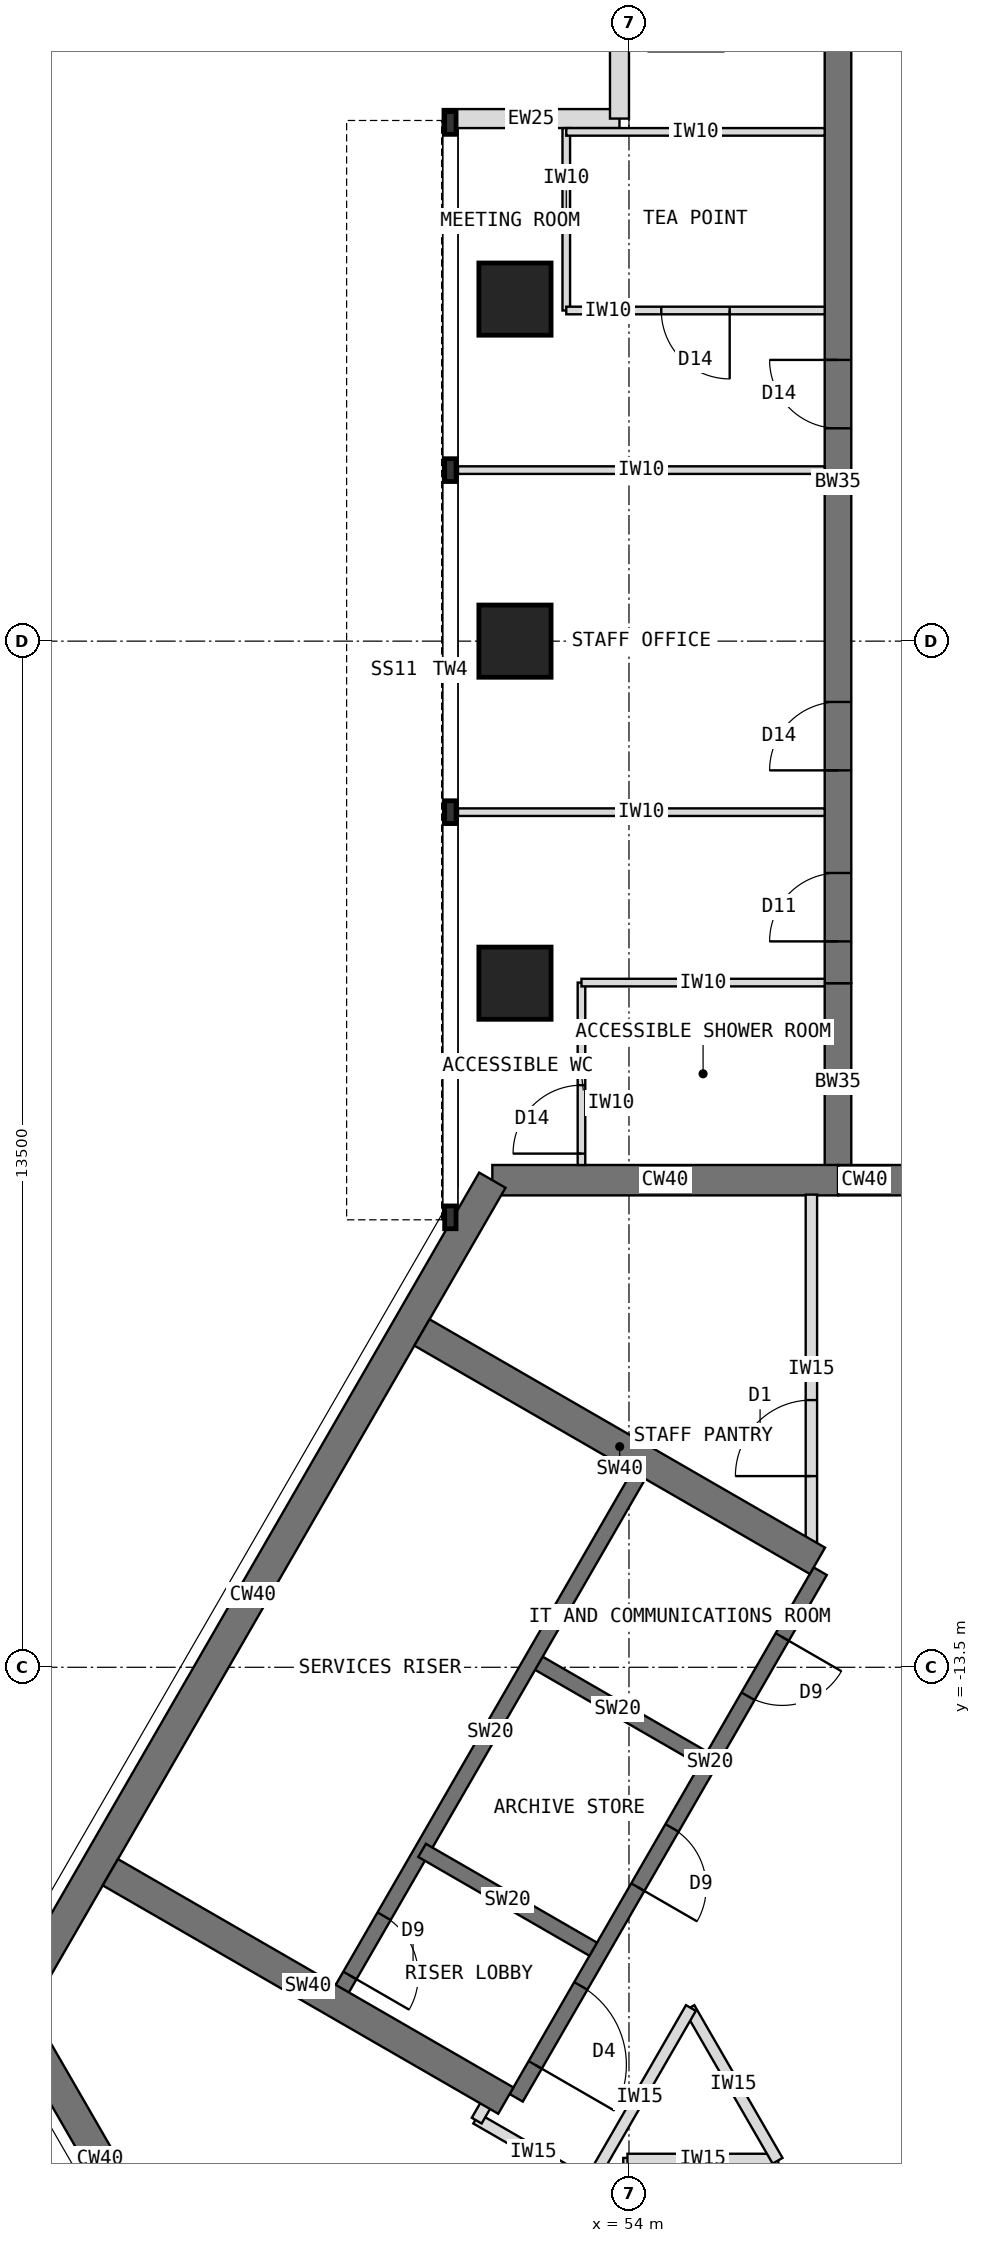
"""IFC4 building model, lengths in metres.
Left out: names, types, materials, properties, quantities, classifications, styles, units other than length and angle.
Written with IfcOpenShell. Run it as: python <this file> out.ifc"""

import sys

from ifc_helpers import new_model, si_unit, direction, frame, frame_2d, origin, origin_2d, place, context, subcontext, project, spatial, rectangle, extrude, element, fill, save


model = new_model("IFC4")
c1 = context("Model", 3, precision=1e-05, world=origin(), true_north=direction((0.0, 1.0)))
c2 = subcontext(c1, "Body", "Model", "MODEL_VIEW")
j1 = project(units=[si_unit("LENGTHUNIT", "METRE"), si_unit("PLANEANGLEUNIT", "RADIAN")], contexts=[c1])
p1 = place(None, origin())
s1 = spatial("IfcSite", under=j1, at=p1, CompositionType="ELEMENT")
p2 = place(p1, origin())
s2 = spatial("IfcBuilding", under=s1, at=p2, CompositionType="ELEMENT")
p3 = place(p2, frame((0.0, 0.0, 287.5)))
s3 = spatial("IfcBuildingStorey", under=s2, at=p3, CompositionType="ELEMENT", Elevation=287.5)
p4 = place(p3, frame((60.25, -7.092, 0.0), z_axis=(0.0, 0.0, 1.0), x_axis=(-1.0, 0.0, 0.0)))
e1 = element("IfcWall", 1, at=p4, inside=s3, PredefinedType="SHEAR", context=c2, shape_type="SweptSolid", body=[
    extrude(rectangle(XDim=3.5, YDim=0.4, at=frame_2d((1.75, 0.0))), origin(), (0.0, 0.0, 1.0), 4.0),
])
p5 = place(p4, frame((0.85, 0.0, 0.0)))
e2 = element("IfcOpeningElement", 2, at=p5, cuts=e1, PredefinedType="OPENING", context=c2, shape_type="SweptSolid", body=[
    extrude(rectangle(XDim=1.8, YDim=2.1, at=frame_2d((0.9, 1.05))), frame((0.0, 0.21, 0.0), z_axis=(0.0, -1.0, 0.0), x_axis=(1.0, 0.0, 0.0)), (0.0, 0.0, 1.0), 0.42),
])
p6 = place(p3, frame((56.75, -7.092, 0.0), z_axis=(0.0, 0.0, 1.0), x_axis=(-1.0, 0.0, 0.0)))
e3 = element("IfcWall", 3, at=p6, inside=s3, PredefinedType="SHEAR", context=c2, shape_type="SweptSolid", body=[
    extrude(rectangle(XDim=4.548, YDim=0.4, at=frame_2d((2.274, 0.0))), origin(), (0.0, 0.0, 1.0), 4.0),
])
p7 = place(p3, frame((52.202, -7.092, 0.0), z_axis=(0.0, 0.0, 1.0), x_axis=(-0.500005998175, -0.866021940709, 0.0)))
e4 = element("IfcWall", 4, at=p7, inside=s3, PredefinedType="SHEAR", context=c2, shape_type="SweptSolid", body=[
    extrude(rectangle(XDim=12.596, YDim=0.4, at=frame_2d((6.298, 0.0))), origin(), (0.0, 0.0, 1.0), 4.0),
])
p8 = place(p3, frame((45.904, -18.0, 0.0), z_axis=(0.0, 0.0, 1.0), x_axis=(0.500024481964, -0.866011268655, 0.0)))
e5 = element("IfcWall", 5, at=p8, inside=s3, PredefinedType="SHEAR", context=c2, shape_type="SweptSolid", body=[
    extrude(rectangle(XDim=4.548, YDim=0.4, at=frame_2d((2.274, 0.0))), origin(), (0.0, 0.0, 1.0), 4.0),
])
p9 = place(p3, frame((56.75, -7.092, 0.0), z_axis=(0.0, 0.0, 1.0), x_axis=(0.0, 1.0, 0.0)))
e6 = element("IfcWall", 6, at=p9, inside=s3, PredefinedType="SHEAR", context=c2, shape_type="SweptSolid", body=[
    extrude(rectangle(XDim=2.592, YDim=0.35, at=frame_2d((1.296, 0.0))), origin(), (0.0, 0.0, 1.0), 4.0),
])
p10 = place(p3, frame((56.75, -4.5, 0.0), z_axis=(0.0, 0.0, 1.0), x_axis=(0.0, 1.0, 0.0)))
e7 = element("IfcWall", 7, at=p10, inside=s3, PredefinedType="SHEAR", context=c2, shape_type="SweptSolid", body=[
    extrude(rectangle(XDim=13.2, YDim=0.35, at=frame_2d((6.6, 0.0))), origin(), (0.0, 0.0, 1.0), 4.0),
])
p11 = place(p10, frame((0.55, 0.0, 0.0)))
e8 = element("IfcOpeningElement", 8, at=p11, cuts=e7, PredefinedType="OPENING", context=c2, shape_type="SweptSolid", body=[
    extrude(rectangle(XDim=0.9, YDim=2.1, at=frame_2d((0.45, 1.05))), frame((0.0, 0.185, 0.0), z_axis=(0.0, -1.0, 0.0), x_axis=(1.0, 0.0, 0.0)), (0.0, 0.0, 1.0), 0.37),
])
p12 = place(p10, frame((2.8, 0.0, 0.0)))
e9 = element("IfcOpeningElement", 9, at=p12, cuts=e7, PredefinedType="OPENING", context=c2, shape_type="SweptSolid", body=[
    extrude(rectangle(XDim=0.9, YDim=2.1, at=frame_2d((0.45, 1.05))), frame((0.0, 0.185, 0.0), z_axis=(0.0, -1.0, 0.0), x_axis=(1.0, 0.0, 0.0)), (0.0, 0.0, 1.0), 0.37),
])
p13 = place(p10, frame((7.3, 0.0, 0.0)))
e10 = element("IfcOpeningElement", 10, at=p13, cuts=e7, PredefinedType="OPENING", context=c2, shape_type="SweptSolid", body=[
    extrude(rectangle(XDim=0.9, YDim=2.1, at=frame_2d((0.45, 1.05))), frame((0.0, 0.185, 0.0), z_axis=(0.0, -1.0, 0.0), x_axis=(1.0, 0.0, 0.0)), (0.0, 0.0, 1.0), 0.37),
])
for number, where, z_axis, x_axis in (
    (11, (52.5, -4.5, 0.0), (0.0, 0.0, 1.0), (1.0, 0.0, 0.0)),
    (12, (52.5, 0.0, 0.0), (0.0, 0.0, 1.0), (1.0, 0.0, 0.0)),
    (13, (52.5, 4.5, 0.0), (0.0, 0.0, 1.0), (1.0, 0.0, 0.0)),
):
    element("IfcColumn", number, at=place(p3, frame(where, z_axis=z_axis, x_axis=x_axis)), inside=s3, PredefinedType="COLUMN", context=c2, shape_type="SweptSolid", body=[
        extrude(rectangle(XDim=0.95, YDim=0.95, at=origin_2d()), origin(), (0.0, 0.0, 1.0), 4.0),
    ])
for number, where, z_axis, x_axis in (
    (14, (51.55, 6.875, 0.0), (0.0, 0.0, 1.0), (1.0, 0.0, 0.0)),
    (15, (53.875, 6.875, 0.0), (0.0, 0.0, 1.0), (0.0, 1.0, 0.0)),
):
    element("IfcWall", number, at=place(p3, frame(where, z_axis=z_axis, x_axis=x_axis)), inside=s3, PredefinedType="STANDARD", context=c2, shape_type="SweptSolid", body=[
        extrude(rectangle(XDim=2.325, YDim=0.25, at=frame_2d((1.163, 0.0))), origin(), (0.0, 0.0, 1.0), 3.7),
    ])
p14 = place(p3, frame((56.516, -12.236, 0.0), z_axis=(0.0, 0.0, 1.0), x_axis=(-0.49999894854, -0.866026010844, 0.0)))
e16 = element("IfcWall", 16, at=p14, inside=s3, PredefinedType="SHEAR", context=c2, shape_type="SweptSolid", body=[
    extrude(rectangle(XDim=8.0, YDim=0.2, at=frame_2d((4.0, 0.0))), origin(), (0.0, 0.0, 1.0), 4.0),
])
p15 = place(p14, frame((6.3, 0.0, 0.0)))
e17 = element("IfcOpeningElement", 17, at=p15, cuts=e16, PredefinedType="OPENING", context=c2, shape_type="SweptSolid", body=[
    extrude(rectangle(XDim=1.2, YDim=2.1, at=frame_2d((0.6, 1.05))), frame((0.0, 0.11, 0.0), z_axis=(0.0, -1.0, 0.0), x_axis=(1.0, 0.0, 0.0)), (0.0, 0.0, 1.0), 0.22),
])
p16 = place(p14, frame((1.0, 0.0, 0.0)))
e18 = element("IfcOpeningElement", 18, at=p16, cuts=e16, PredefinedType="OPENING", context=c2, shape_type="SweptSolid", body=[
    extrude(rectangle(XDim=0.9, YDim=2.1, at=frame_2d((0.45, 1.05))), frame((0.0, 0.11, 0.0), z_axis=(0.0, -1.0, 0.0), x_axis=(1.0, 0.0, 0.0)), (0.0, 0.0, 1.0), 0.22),
])
p17 = place(p14, frame((3.9, 0.0, 0.0)))
e19 = element("IfcOpeningElement", 19, at=p17, cuts=e16, PredefinedType="OPENING", context=c2, shape_type="SweptSolid", body=[
    extrude(rectangle(XDim=0.9, YDim=2.1, at=frame_2d((0.45, 1.05))), frame((0.0, 0.11, 0.0), z_axis=(0.0, -1.0, 0.0), x_axis=(1.0, 0.0, 0.0)), (0.0, 0.0, 1.0), 0.22),
])
for number, where, z_axis, x_axis in (
    (20, (54.98, -14.697, 0.0), (0.0, 0.0, 1.0), (-0.866, 0.5, 0.0)),
    (21, (53.53, -17.209, 0.0), (0.0, 0.0, 1.0), (-0.866, 0.5, 0.0)),
):
    element("IfcWall", number, at=place(p3, frame(where, z_axis=z_axis, x_axis=x_axis)), inside=s3, PredefinedType="SHEAR", context=c2, shape_type="SweptSolid", body=[
        extrude(rectangle(XDim=2.6, YDim=0.2, at=frame_2d((1.3, 0.0))), origin(), (0.0, 0.0, 1.0), 4.0),
    ])
p18 = place(p3, frame((54.178, -10.886, 0.0), z_axis=(0.0, 0.0, 1.0), x_axis=(-0.49999894854, -0.866026010844, 0.0)))
e22 = element("IfcWall", 22, at=p18, inside=s3, PredefinedType="SHEAR", context=c2, shape_type="SweptSolid", body=[
    extrude(rectangle(XDim=8.0, YDim=0.2, at=frame_2d((4.0, 0.0))), origin(), (0.0, 0.0, 1.0), 4.0),
])
p19 = place(p18, frame((6.8, 0.0, 0.0)))
e23 = element("IfcOpeningElement", 23, at=p19, cuts=e22, PredefinedType="OPENING", context=c2, shape_type="SweptSolid", body=[
    extrude(rectangle(XDim=0.9, YDim=2.1, at=frame_2d((0.45, 1.05))), frame((0.0, 0.11, 0.0), z_axis=(0.0, -1.0, 0.0), x_axis=(1.0, 0.0, 0.0)), (0.0, 0.0, 1.0), 0.22),
])
for number, where, z_axis, x_axis in (
    (24, (52.38, -19.201, 0.0), (0.0, 0.0, 1.0), (-0.866, 0.5, 0.0)),
    (25, (56.48, -12.099, 0.0), (0.0, 0.0, 1.0), (-0.866, 0.5, 0.0)),
):
    element("IfcWall", number, at=place(p3, frame(where, z_axis=z_axis, x_axis=x_axis)), inside=s3, PredefinedType="SHEAR", context=c2, shape_type="SweptSolid", body=[
        extrude(rectangle(XDim=6.008, YDim=0.4, at=frame_2d((3.004, 0.0))), origin(), (0.0, 0.0, 1.0), 4.0),
    ])
for number, where, z_axis, x_axis in (
    (26, (56.575, -2.25, 0.0), (0.0, 0.0, 1.0), (-1.0, 0.0, 0.0)),
    (27, (56.575, 2.25, 0.0), (0.0, 0.0, 1.0), (-1.0, 0.0, 0.0)),
):
    element("IfcWall", number, at=place(p3, frame(where, z_axis=z_axis, x_axis=x_axis)), inside=s3, PredefinedType="PARTITIONING", context=c2, shape_type="SweptSolid", body=[
        extrude(rectangle(XDim=4.825, YDim=0.1, at=frame_2d((2.413, 0.0))), origin(), (0.0, 0.0, 1.0), 3.7),
    ])
p20 = place(p3, frame((53.175, 4.35, 0.0), z_axis=(0.0, 0.0, 1.0), x_axis=(0.0, 1.0, 0.0)))
e28 = element("IfcWall", 28, at=p20, inside=s3, PredefinedType="PARTITIONING", context=c2, shape_type="SweptSolid", body=[
    extrude(rectangle(XDim=2.4, YDim=0.1, at=frame_2d((1.2, 0.0))), origin(), (0.0, 0.0, 1.0), 3.7),
])
p21 = place(p3, frame((56.575, 4.35, 0.0), z_axis=(0.0, 0.0, 1.0), x_axis=(-1.0, 0.0, 0.0)))
e29 = element("IfcWall", 29, at=p21, inside=s3, PredefinedType="PARTITIONING", context=c2, shape_type="SweptSolid", body=[
    extrude(rectangle(XDim=3.4, YDim=0.1, at=frame_2d((1.7, 0.0))), origin(), (0.0, 0.0, 1.0), 3.7),
])
p22 = place(p21, frame((1.25, 0.0, 0.0)))
e30 = element("IfcOpeningElement", 30, at=p22, cuts=e29, PredefinedType="OPENING", context=c2, shape_type="SweptSolid", body=[
    extrude(rectangle(XDim=0.9, YDim=2.1, at=frame_2d((0.45, 1.05))), frame((0.0, 0.06, 0.0), z_axis=(0.0, -1.0, 0.0), x_axis=(1.0, 0.0, 0.0)), (0.0, 0.0, 1.0), 0.12),
])
p23 = place(p3, frame((56.575, 6.7, 0.0), z_axis=(0.0, 0.0, 1.0), x_axis=(-1.0, 0.0, 0.0)))
e31 = element("IfcWall", 31, at=p23, inside=s3, PredefinedType="PARTITIONING", context=c2, shape_type="SweptSolid", body=[
    extrude(rectangle(XDim=3.4, YDim=0.1, at=frame_2d((1.7, 0.0))), origin(), (0.0, 0.0, 1.0), 3.7),
])
p24 = place(p3, frame((53.375, -6.892, 0.0), z_axis=(0.0, 0.0, 1.0), x_axis=(0.0, 1.0, 0.0)))
e32 = element("IfcWall", 32, at=p24, inside=s3, PredefinedType="PARTITIONING", context=c2, shape_type="SweptSolid", body=[
    extrude(rectangle(XDim=2.4, YDim=0.1, at=frame_2d((1.2, 0.0))), origin(), (0.0, 0.0, 1.0), 3.7),
])
p25 = place(p24, frame((0.15, 0.0, 0.0)))
e33 = element("IfcOpeningElement", 33, at=p25, cuts=e32, PredefinedType="OPENING", context=c2, shape_type="SweptSolid", body=[
    extrude(rectangle(XDim=0.9, YDim=2.1, at=frame_2d((0.45, 1.05))), frame((0.0, 0.06, 0.0), z_axis=(0.0, -1.0, 0.0), x_axis=(1.0, 0.0, 0.0)), (0.0, 0.0, 1.0), 0.12),
])
p26 = place(p3, frame((56.575, -4.492, 0.0), z_axis=(0.0, 0.0, 1.0), x_axis=(-1.0, 0.0, 0.0)))
e34 = element("IfcWall", 34, at=p26, inside=s3, PredefinedType="PARTITIONING", context=c2, shape_type="SweptSolid", body=[
    extrude(rectangle(XDim=3.2, YDim=0.1, at=frame_2d((1.6, 0.0))), origin(), (0.0, 0.0, 1.0), 3.167),
])
p27 = place(p3, frame((54.0, -22.92, 0.0), z_axis=(0.0, 0.0, 1.0), x_axis=(0.0, 1.0, 0.0)))
e35 = element("IfcWall", 35, at=p27, inside=s3, PredefinedType="PARTITIONING", context=c2, shape_type="SweptSolid", body=[
    extrude(rectangle(XDim=2.965, YDim=0.15, at=frame_2d((1.482, 0.0))), origin(), (0.0, 0.0, 1.0), 3.7),
])
p28 = place(p27, frame((0.8, 0.0, 0.0)))
e36 = element("IfcOpeningElement", 36, at=p28, cuts=e35, PredefinedType="OPENING", context=c2, shape_type="SweptSolid", body=[
    extrude(rectangle(XDim=1.0, YDim=2.1, at=frame_2d((0.5, 1.05))), frame((0.0, 0.085, 0.0), z_axis=(0.0, -1.0, 0.0), x_axis=(1.0, 0.0, 0.0)), (0.0, 0.0, 1.0), 0.17),
])
p29 = place(p3, frame((53.98, -19.975, 0.0), z_axis=(0.0, 0.0, 1.0), x_axis=(1.0, 0.0, 0.0)))
e37 = element("IfcWall", 37, at=p29, inside=s3, PredefinedType="PARTITIONING", context=c2, shape_type="SweptSolid", body=[
    extrude(rectangle(XDim=1.985, YDim=0.15, at=frame_2d((0.993, 0.0))), origin(), (0.0, 0.0, 1.0), 3.7),
])
p30 = place(p3, frame((55.955, -19.992, 0.0), z_axis=(0.0, 0.0, 1.0), x_axis=(-0.499941024108, 0.866059450854, 0.0)))
e38 = element("IfcWall", 38, at=p30, inside=s3, PredefinedType="PARTITIONING", context=c2, shape_type="SweptSolid", body=[
    extrude(rectangle(XDim=2.321, YDim=0.15, at=frame_2d((1.16, 0.0))), origin(), (0.0, 0.0, 1.0), 3.7),
])
p31 = place(p3, frame((54.815, -17.983, 0.0), z_axis=(0.0, 0.0, 1.0), x_axis=(-0.499981473571, -0.866036099759, 0.0)))
e39 = element("IfcWall", 39, at=p31, inside=s3, PredefinedType="PARTITIONING", context=c2, shape_type="SweptSolid", body=[
    extrude(rectangle(XDim=2.692, YDim=0.15, at=frame_2d((1.346, 0.0))), origin(), (0.0, 0.0, 1.0), 3.7),
])
p32 = place(p3, frame((53.496, -20.307, 0.0), z_axis=(0.0, 0.0, 1.0), x_axis=(-0.865989304205, 0.500062521093, 0.0)))
e40 = element("IfcWall", 40, at=p32, inside=s3, PredefinedType="PARTITIONING", context=c2, shape_type="SweptSolid", body=[
    extrude(rectangle(XDim=1.74, YDim=0.15, at=frame_2d((0.87, 0.0))), origin(), (0.0, 0.0, 1.0), 3.7),
])
p33 = place(p3, frame((51.997, -19.464, 0.0), z_axis=(0.0, 0.0, 1.0), x_axis=(0.499804398801, 0.866138304741, 0.0)))
e41 = element("IfcWall", 41, at=p33, inside=s3, PredefinedType="PARTITIONING", context=c2, shape_type="SweptSolid", body=[
    extrude(rectangle(XDim=0.43, YDim=0.15, at=frame_2d((0.215, 0.0))), origin(), (0.0, 0.0, 1.0), 3.7),
])
p34 = place(p3, frame((56.4, -11.857, 0.0), z_axis=(0.0, 0.0, 1.0), x_axis=(0.0, 1.0, 0.0)))
e42 = element("IfcWall", 42, at=p34, inside=s3, PredefinedType="PARTITIONING", context=c2, shape_type="SweptSolid", body=[
    extrude(rectangle(XDim=4.576, YDim=0.15, at=frame_2d((2.288, 0.0))), origin(), (0.0, 0.0, 1.0), 3.7),
])
p35 = place(p34, frame((0.873, 0.0, 0.0)))
e43 = element("IfcOpeningElement", 43, at=p35, cuts=e42, PredefinedType="OPENING", context=c2, shape_type="SweptSolid", body=[
    extrude(rectangle(XDim=1.0, YDim=2.1, at=frame_2d((0.5, 1.05))), frame((0.0, 0.085, 0.0), z_axis=(0.0, -1.0, 0.0), x_axis=(1.0, 0.0, 0.0)), (0.0, 0.0, 1.0), 0.17),
])
p36 = place(p15, origin())
e44 = element("IfcDoor", 44, at=p36, inside=s3, OperationType="SINGLE_SWING_RIGHT", PredefinedType="DOOR", context=c2, shape_type="SweptSolid", body=[
    extrude(rectangle(XDim=1.2, YDim=2.1, at=frame_2d((0.6, 1.05))), frame((0.0, 0.025, 0.0), z_axis=(0.0, -1.0, 0.0), x_axis=(1.0, 0.0, 0.0)), (0.0, 0.0, 1.0), 0.05),
])
fill(e17, e44)
p37 = place(p19, origin())
e45 = element("IfcDoor", 45, at=p37, inside=s3, OperationType="SINGLE_SWING_RIGHT", PredefinedType="DOOR", context=c2, shape_type="SweptSolid", body=[
    extrude(rectangle(XDim=0.9, YDim=2.1, at=frame_2d((0.45, 1.05))), frame((0.0, 0.025, 0.0), z_axis=(0.0, -1.0, 0.0), x_axis=(1.0, 0.0, 0.0)), (0.0, 0.0, 1.0), 0.05),
])
fill(e23, e45)
p38 = place(p22, origin())
e46 = element("IfcDoor", 46, at=p38, inside=s3, OperationType="SINGLE_SWING_LEFT", PredefinedType="DOOR", context=c2, shape_type="SweptSolid", body=[
    extrude(rectangle(XDim=0.9, YDim=2.1, at=frame_2d((0.45, 1.05))), frame((0.0, 0.025, 0.0), z_axis=(0.0, -1.0, 0.0), x_axis=(1.0, 0.0, 0.0)), (0.0, 0.0, 1.0), 0.05),
])
fill(e30, e46)
p39 = place(p25, origin())
e47 = element("IfcDoor", 47, at=p39, inside=s3, OperationType="SINGLE_SWING_LEFT", PredefinedType="DOOR", context=c2, shape_type="SweptSolid", body=[
    extrude(rectangle(XDim=0.9, YDim=2.1, at=frame_2d((0.45, 1.05))), frame((0.0, 0.025, 0.0), z_axis=(0.0, -1.0, 0.0), x_axis=(1.0, 0.0, 0.0)), (0.0, 0.0, 1.0), 0.05),
])
fill(e33, e47)
p40 = place(p35, origin())
e48 = element("IfcDoor", 48, at=p40, inside=s3, OperationType="SINGLE_SWING_LEFT", PredefinedType="DOOR", context=c2, shape_type="SweptSolid", body=[
    extrude(rectangle(XDim=1.0, YDim=2.1, at=frame_2d((0.5, 1.05))), frame((0.0, 0.025, 0.0), z_axis=(0.0, -1.0, 0.0), x_axis=(1.0, 0.0, 0.0)), (0.0, 0.0, 1.0), 0.05),
])
fill(e43, e48)
p41 = place(p11, origin())
e49 = element("IfcDoor", 49, at=p41, inside=s3, OperationType="SINGLE_SWING_LEFT", PredefinedType="DOOR", context=c2, shape_type="SweptSolid", body=[
    extrude(rectangle(XDim=0.9, YDim=2.1, at=frame_2d((0.45, 1.05))), frame((0.0, 0.025, 0.0), z_axis=(0.0, -1.0, 0.0), x_axis=(1.0, 0.0, 0.0)), (0.0, 0.0, 1.0), 0.05),
])
fill(e8, e49)
p42 = place(p12, origin())
e50 = element("IfcDoor", 50, at=p42, inside=s3, OperationType="SINGLE_SWING_LEFT", PredefinedType="DOOR", context=c2, shape_type="SweptSolid", body=[
    extrude(rectangle(XDim=0.9, YDim=2.1, at=frame_2d((0.45, 1.05))), frame((0.0, 0.025, 0.0), z_axis=(0.0, -1.0, 0.0), x_axis=(1.0, 0.0, 0.0)), (0.0, 0.0, 1.0), 0.05),
])
fill(e9, e50)
p43 = place(p13, origin())
e51 = element("IfcDoor", 51, at=p43, inside=s3, OperationType="SINGLE_SWING_RIGHT", PredefinedType="DOOR", context=c2, shape_type="SweptSolid", body=[
    extrude(rectangle(XDim=0.9, YDim=2.1, at=frame_2d((0.45, 1.05))), frame((0.0, 0.025, 0.0), z_axis=(0.0, -1.0, 0.0), x_axis=(1.0, 0.0, 0.0)), (0.0, 0.0, 1.0), 0.05),
])
fill(e10, e51)
p44 = place(p16, origin())
e52 = element("IfcDoor", 52, at=p44, inside=s3, OperationType="SINGLE_SWING_LEFT", PredefinedType="DOOR", context=c2, shape_type="SweptSolid", body=[
    extrude(rectangle(XDim=0.9, YDim=2.1, at=frame_2d((0.45, 1.05))), frame((0.0, 0.025, 0.0), z_axis=(0.0, -1.0, 0.0), x_axis=(1.0, 0.0, 0.0)), (0.0, 0.0, 1.0), 0.05),
])
fill(e18, e52)
p45 = place(p17, origin())
e53 = element("IfcDoor", 53, at=p45, inside=s3, OperationType="SINGLE_SWING_RIGHT", PredefinedType="DOOR", context=c2, shape_type="SweptSolid", body=[
    extrude(rectangle(XDim=0.9, YDim=2.1, at=frame_2d((0.45, 1.05))), frame((0.0, 0.025, 0.0), z_axis=(0.0, -1.0, 0.0), x_axis=(1.0, 0.0, 0.0)), (0.0, 0.0, 1.0), 0.05),
])
fill(e19, e53)
save(model, sys.argv[1])
